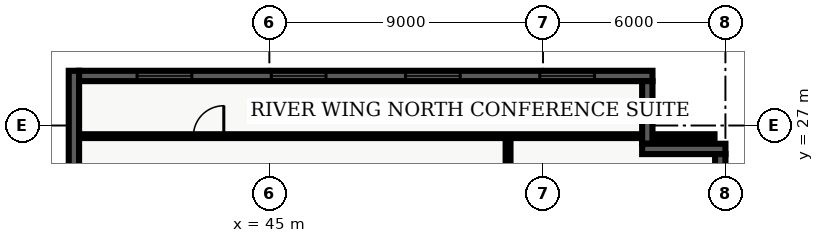
"""IFC4 building model, lengths in metres.
Left out: names, types, materials, properties, quantities, classifications, styles, units other than length and angle.
Written with IfcOpenShell. Run it as: python <this file> out.ifc"""

import sys

from ifc_helpers import new_model, entity, si_unit, converted_unit, direction, frame, origin_with_axes, origin_2d_with_axis, place, context, subcontext, project, spatial, polyline, rectangle, outline, extrude, element, fill, save


model = new_model("IFC4")
c1 = context("Model", 3, precision=1e-05, world=origin_with_axes(), true_north=direction((0.0, 1.0)))
c2 = subcontext(c1, "Body", "Model", "MODEL_VIEW")
j1 = project(units=[si_unit("LENGTHUNIT", "METRE"), converted_unit("PLANEANGLEUNIT", "DEGREE", entity("IfcPlaneAngleMeasure", 0.017), si_unit("PLANEANGLEUNIT", "RADIAN"), dimensions=[0, 0, 0, 0, 0, 0, 0])], contexts=[c1])
p1 = place(None, origin_with_axes())
s1 = spatial("IfcSite", under=j1, at=p1, CompositionType="ELEMENT")
p2 = place(p1, origin_with_axes())
s2 = spatial("IfcBuilding", under=s1, at=p2, CompositionType="ELEMENT")
p3 = place(p2, frame((0.0, 0.0, 183.6), z_axis=(0.0, 0.0, 1.0), x_axis=(1.0, 0.0, 0.0)))
s3 = spatial("IfcBuildingStorey", under=s2, at=p3, CompositionType="ELEMENT", Elevation=183.6)
p4 = place(p3, frame((52.85, 7.85, 0.0), z_axis=(0.0, 0.0, 1.0), x_axis=(0.0, 1.0, 0.0)))
e1 = element("IfcWall", 1, at=p4, inside=s3, PredefinedType="PARTITIONING", context=c2, shape_type="SweptSolid", body=[
    extrude(outline(polyline([(0.0, -0.08), (18.8, -0.08), (18.8, 0.08), (0.0, 0.08), (0.0, -0.08)])), origin_with_axes(), (0.0, 0.0, 1.0), 2.64),
])
p5 = place(p4, frame((0.684, 0.0, 0.0), z_axis=(0.0, 0.0, 1.0), x_axis=(1.0, 0.0, 0.0)))
e2 = element("IfcOpeningElement", 2, at=p5, cuts=e1, PredefinedType="OPENING", context=c2, shape_type="SweptSolid", body=[
    extrude(rectangle(XDim=0.9, YDim=0.18, at=origin_2d_with_axis()), origin_with_axes(), (0.0, 0.0, 1.0), 2.15),
])
p6 = place(p4, frame((5.907, 0.0, 0.0), z_axis=(0.0, 0.0, 1.0), x_axis=(1.0, 0.0, 0.0)))
e3 = element("IfcOpeningElement", 3, at=p6, cuts=e1, PredefinedType="OPENING", context=c2, shape_type="SweptSolid", body=[
    extrude(rectangle(XDim=1.0, YDim=0.18, at=origin_2d_with_axis()), origin_with_axes(), (0.0, 0.0, 1.0), 2.15),
])
p7 = place(p4, frame((11.368, 0.0, 0.0), z_axis=(0.0, 0.0, 1.0), x_axis=(1.0, 0.0, 0.0)))
e4 = element("IfcOpeningElement", 4, at=p7, cuts=e1, PredefinedType="OPENING", context=c2, shape_type="SweptSolid", body=[
    extrude(rectangle(XDim=1.0, YDim=0.18, at=origin_2d_with_axis()), origin_with_axes(), (0.0, 0.0, 1.0), 2.15),
])
p8 = place(p4, frame((14.204, 0.0, 0.0), z_axis=(0.0, 0.0, 1.0), x_axis=(1.0, 0.0, 0.0)))
e5 = element("IfcOpeningElement", 5, at=p8, cuts=e1, PredefinedType="OPENING", context=c2, shape_type="SweptSolid", body=[
    extrude(rectangle(XDim=1.0, YDim=0.18, at=origin_2d_with_axis()), origin_with_axes(), (0.0, 0.0, 1.0), 2.15),
])
p9 = place(p3, frame((38.735, 26.65, 0.0), z_axis=(0.0, 0.0, 1.0), x_axis=(1.0, 0.0, 0.0)))
e6 = element("IfcWall", 6, at=p9, inside=s3, PredefinedType="PARTITIONING", context=c2, shape_type="SweptSolid", body=[
    extrude(outline(polyline([(0.0, -0.062), (20.905, -0.062), (20.905, 0.062), (0.0, 0.062), (0.0, -0.062)])), origin_with_axes(), (0.0, 0.0, 1.0), 2.64),
])
p10 = place(p9, frame((4.265, 0.0, 0.0), z_axis=(0.0, 0.0, 1.0), x_axis=(1.0, 0.0, 0.0)))
e7 = element("IfcOpeningElement", 7, at=p10, cuts=e6, PredefinedType="OPENING", context=c2, shape_type="SweptSolid", body=[
    extrude(rectangle(XDim=1.0, YDim=0.145, at=origin_2d_with_axis()), origin_with_axes(), (0.0, 0.0, 1.0), 2.15),
])
p11 = place(p3, frame((38.57, 21.26, 0.0), z_axis=(0.0, 0.0, 1.0), x_axis=(0.0, 1.0, 0.0)))
e8 = element("IfcWall", 8, at=p11, inside=s3, PredefinedType="SOLIDWALL", context=c2, shape_type="SweptSolid", body=[
    extrude(outline(polyline([(0.0, -0.17), (7.54, -0.17), (7.54, 0.17), (0.0, 0.17), (0.0, -0.17)])), origin_with_axes(), (0.0, 0.0, 1.0), 3.6),
])
p12 = place(p3, frame((38.74, 28.63, 0.0), z_axis=(0.0, 0.0, 1.0), x_axis=(1.0, 0.0, 0.0)))
e9 = element("IfcWall", 9, at=p12, inside=s3, PredefinedType="SOLIDWALL", context=c2, shape_type="SweptSolid", body=[
    extrude(outline(polyline([(0.0, -0.17), (18.86, -0.17), (18.86, 0.17), (0.0, 0.17), (0.0, -0.17)])), origin_with_axes(), (0.0, 0.0, 1.0), 3.6),
])
p13 = place(p12, frame((2.808, 0.0, 0.45), z_axis=(0.0, 0.0, 1.0), x_axis=(1.0, 0.0, 0.0)))
e10 = element("IfcOpeningElement", 10, at=p13, cuts=e9, PredefinedType="OPENING", context=c2, shape_type="SweptSolid", body=[
    extrude(rectangle(XDim=1.8, YDim=0.36, at=origin_2d_with_axis()), origin_with_axes(), (0.0, 0.0, 1.0), 2.1),
])
p14 = place(p12, frame((7.222, 0.0, 0.45), z_axis=(0.0, 0.0, 1.0), x_axis=(1.0, 0.0, 0.0)))
e11 = element("IfcOpeningElement", 11, at=p14, cuts=e9, PredefinedType="OPENING", context=c2, shape_type="SweptSolid", body=[
    extrude(rectangle(XDim=1.8, YDim=0.36, at=origin_2d_with_axis()), origin_with_axes(), (0.0, 0.0, 1.0), 2.1),
])
p15 = place(p12, frame((11.637, 0.0, 0.45), z_axis=(0.0, 0.0, 1.0), x_axis=(1.0, 0.0, 0.0)))
e12 = element("IfcOpeningElement", 12, at=p15, cuts=e9, PredefinedType="OPENING", context=c2, shape_type="SweptSolid", body=[
    extrude(rectangle(XDim=1.8, YDim=0.36, at=origin_2d_with_axis()), origin_with_axes(), (0.0, 0.0, 1.0), 2.1),
])
p16 = place(p12, frame((16.053, 0.0, 0.45), z_axis=(0.0, 0.0, 1.0), x_axis=(1.0, 0.0, 0.0)))
e13 = element("IfcOpeningElement", 13, at=p16, cuts=e9, PredefinedType="OPENING", context=c2, shape_type="SweptSolid", body=[
    extrude(rectangle(XDim=1.8, YDim=0.36, at=origin_2d_with_axis()), origin_with_axes(), (0.0, 0.0, 1.0), 2.1),
])
p17 = place(p3, frame((57.43, 28.46, 0.0), z_axis=(0.0, 0.0, 1.0), x_axis=(0.0, -1.0, 0.0)))
e14 = element("IfcWall", 14, at=p17, inside=s3, PredefinedType="SOLIDWALL", context=c2, shape_type="SweptSolid", body=[
    extrude(outline(polyline([(0.0, -0.17), (2.06, -0.17), (2.06, 0.17), (0.0, 0.17), (0.0, -0.17)])), origin_with_axes(), (0.0, 0.0, 1.0), 3.6),
])
p18 = place(p3, frame((57.26, 26.23, 0.0), z_axis=(0.0, 0.0, 1.0), x_axis=(1.0, 0.0, 0.0)))
e15 = element("IfcWall", 15, at=p18, inside=s3, PredefinedType="SOLIDWALL", context=c2, shape_type="SweptSolid", body=[
    extrude(outline(polyline([(0.0, -0.17), (2.74, -0.17), (2.74, 0.17), (0.0, 0.17), (0.0, -0.17)])), origin_with_axes(), (0.0, 0.0, 1.0), 3.6),
])
p19 = place(p3, frame((59.83, 26.06, 0.0), z_axis=(0.0, 0.0, 1.0), x_axis=(0.0, -1.0, 0.0)))
e16 = element("IfcWall", 16, at=p19, inside=s3, PredefinedType="SOLIDWALL", context=c2, shape_type="SweptSolid", body=[
    extrude(outline(polyline([(0.0, -0.17), (23.66, -0.17), (23.66, 0.17), (0.0, 0.17), (0.0, -0.17)])), origin_with_axes(), (0.0, 0.0, 1.0), 3.6),
])
p20 = place(p19, frame((3.696, 0.0, 0.45), z_axis=(0.0, 0.0, 1.0), x_axis=(1.0, 0.0, 0.0)))
e17 = element("IfcOpeningElement", 17, at=p20, cuts=e16, PredefinedType="OPENING", context=c2, shape_type="SweptSolid", body=[
    extrude(rectangle(XDim=1.8, YDim=0.36, at=origin_2d_with_axis()), origin_with_axes(), (0.0, 0.0, 1.0), 2.1),
])
p21 = place(p19, frame((11.83, 0.0, 0.45), z_axis=(0.0, 0.0, 1.0), x_axis=(1.0, 0.0, 0.0)))
e18 = element("IfcOpeningElement", 18, at=p21, cuts=e16, PredefinedType="OPENING", context=c2, shape_type="SweptSolid", body=[
    extrude(rectangle(XDim=1.8, YDim=0.36, at=origin_2d_with_axis()), origin_with_axes(), (0.0, 0.0, 1.0), 2.1),
])
p22 = place(p19, frame((20.364, 0.0, 0.45), z_axis=(0.0, 0.0, 1.0), x_axis=(1.0, 0.0, 0.0)))
e19 = element("IfcOpeningElement", 19, at=p22, cuts=e16, PredefinedType="OPENING", context=c2, shape_type="SweptSolid", body=[
    extrude(rectangle(XDim=1.8, YDim=0.36, at=origin_2d_with_axis()), origin_with_axes(), (0.0, 0.0, 1.0), 2.1),
])
p23 = place(p9, frame((4.265, 0.0, 0.0), z_axis=(0.0, 0.0, 1.0), x_axis=(1.0, 0.0, 0.0)))
e20 = element("IfcDoor", 20, at=p23, inside=s3, OperationType="SINGLE_SWING_RIGHT", PredefinedType="DOOR", context=c2, shape_type="SweptSolid", body=[
    extrude(rectangle(XDim=1.0, YDim=0.075, at=origin_2d_with_axis()), origin_with_axes(), (0.0, 0.0, 1.0), 2.15),
])
fill(e7, e20)
p24 = place(p12, frame((2.808, 0.0, 0.45), z_axis=(0.0, 0.0, 1.0), x_axis=(1.0, 0.0, 0.0)))
e21 = element("IfcWindow", 21, at=p24, inside=s3, PredefinedType="WINDOW", context=c2, shape_type="SweptSolid", body=[
    extrude(rectangle(XDim=1.8, YDim=0.09, at=origin_2d_with_axis()), origin_with_axes(), (0.0, 0.0, 1.0), 2.1),
])
fill(e10, e21)
p25 = place(p12, frame((7.222, 0.0, 0.45), z_axis=(0.0, 0.0, 1.0), x_axis=(1.0, 0.0, 0.0)))
e22 = element("IfcWindow", 22, at=p25, inside=s3, PredefinedType="WINDOW", context=c2, shape_type="SweptSolid", body=[
    extrude(rectangle(XDim=1.8, YDim=0.09, at=origin_2d_with_axis()), origin_with_axes(), (0.0, 0.0, 1.0), 2.1),
])
fill(e11, e22)
p26 = place(p12, frame((11.637, 0.0, 0.45), z_axis=(0.0, 0.0, 1.0), x_axis=(1.0, 0.0, 0.0)))
e23 = element("IfcWindow", 23, at=p26, inside=s3, PredefinedType="WINDOW", context=c2, shape_type="SweptSolid", body=[
    extrude(rectangle(XDim=1.8, YDim=0.09, at=origin_2d_with_axis()), origin_with_axes(), (0.0, 0.0, 1.0), 2.1),
])
fill(e12, e23)
p27 = place(p12, frame((16.053, 0.0, 0.45), z_axis=(0.0, 0.0, 1.0), x_axis=(1.0, 0.0, 0.0)))
e24 = element("IfcWindow", 24, at=p27, inside=s3, PredefinedType="WINDOW", context=c2, shape_type="SweptSolid", body=[
    extrude(rectangle(XDim=1.8, YDim=0.09, at=origin_2d_with_axis()), origin_with_axes(), (0.0, 0.0, 1.0), 2.1),
])
fill(e13, e24)
save(model, sys.argv[1])
